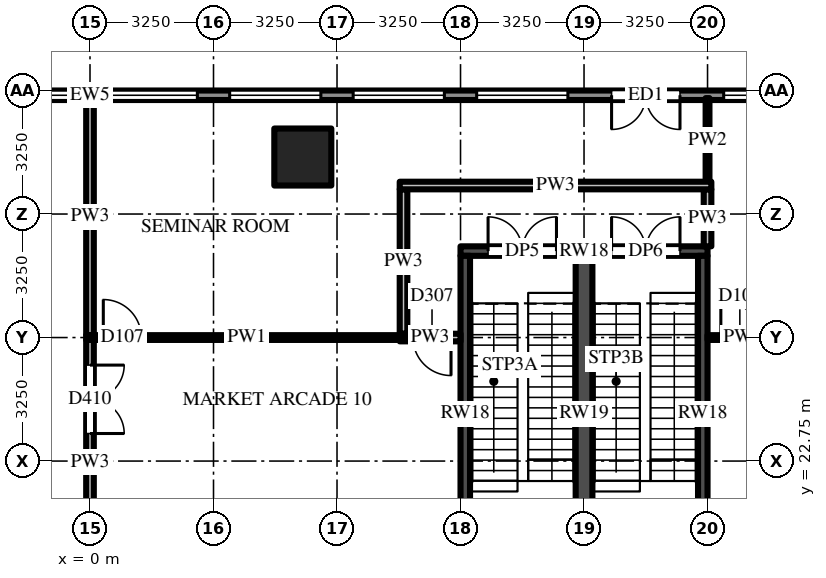
"""IFC4 building model, lengths in metres.
Left out: names, types, materials, properties, quantities, classifications, styles, units other than length and angle.
Written with IfcOpenShell. Run it as: python <this file> out.ifc"""

import sys

from ifc_helpers import new_model, si_unit, direction, frame, frame_2d, origin, origin_2d, place, context, subcontext, project, spatial, rectangle, extrude, source, transform, mapped, element, fill, save


model = new_model("IFC4")
c1 = context("Model", 3, precision=1e-05, world=origin(), true_north=direction((0.0, 1.0)))
c2 = subcontext(c1, "Body", "Model", "MODEL_VIEW")
j1 = project(units=[si_unit("LENGTHUNIT", "METRE"), si_unit("PLANEANGLEUNIT", "RADIAN")], contexts=[c1])
p1 = place(None, origin())
s1 = spatial("IfcSite", under=j1, at=p1, CompositionType="ELEMENT")
p2 = place(p1, origin())
s2 = spatial("IfcBuilding", under=s1, at=p2, CompositionType="ELEMENT")
p3 = place(p2, frame((0.0, 0.0, 24.0)))
s3 = spatial("IfcBuildingStorey", under=s2, at=p3, CompositionType="ELEMENT", Elevation=24.0)
m1 = source(origin(), c2, "Body", "SweptSolid", [
    extrude(rectangle(XDim=1.5, YDim=1.5, at=origin_2d()), origin(), (0.0, 0.0, 1.0), 5.0),
])
p4 = place(p3, frame((5.6, 30.75, 0.0), z_axis=(0.0, 0.0, 1.0), x_axis=(1.0, 0.0, 0.0)))
e1 = element("IfcColumn", 1, at=p4, inside=s3, PredefinedType="COLUMN", context=c2, shape_type="MappedRepresentation", body=[
    mapped(m1, transform((0.0, 0.0, 0.0))),
])
m2 = source(origin(), c2, "Body", "SweptSolid", [
    extrude(rectangle(XDim=6.5, YDim=0.25, at=frame_2d((3.25, 0.0))), origin(), (0.0, 0.0, 1.0), 4.7),
])
p5 = place(p3, frame((9.75, 28.275, 0.0), z_axis=(0.0, 0.0, 1.0), x_axis=(1.0, 0.0, 0.0)))
e2 = element("IfcWall", 2, at=p5, inside=s3, PredefinedType="SHEAR", context=c2, shape_type="MappedRepresentation", body=[
    mapped(m2, transform((0.0, 0.0, 0.0))),
])
m3 = source(origin(), c2, "Body", "SweptSolid", [
    extrude(rectangle(XDim=1.8, YDim=2.1, at=frame_2d((0.9, 1.05))), frame((0.0, 0.135, 0.0), z_axis=(0.0, -1.0, 0.0), x_axis=(1.0, 0.0, 0.0)), (0.0, 0.0, 1.0), 0.27),
])
p6 = place(p5, frame((0.725, 0.0, 0.0)))
e3 = element("IfcOpeningElement", 3, at=p6, cuts=e2, PredefinedType="OPENING", context=c2, shape_type="MappedRepresentation", body=[
    mapped(m3, transform((0.0, 0.0, 0.0))),
])
p7 = place(p5, frame((3.975, 0.0, 0.0)))
e4 = element("IfcOpeningElement", 4, at=p7, cuts=e2, PredefinedType="OPENING", context=c2, shape_type="MappedRepresentation", body=[
    mapped(m3, transform((0.0, 0.0, 0.0))),
])
m4 = source(origin(), c2, "Body", "SweptSolid", [
    extrude(rectangle(XDim=8.3, YDim=0.25, at=frame_2d((4.15, 0.0))), origin(), (0.0, 0.0, 1.0), 4.7),
])
for number, where, z_axis, x_axis in (
    (5, (9.875, 19.85, 0.0), (0.0, 0.0, 1.0), (0.0, 1.0, 0.0)),
    (6, (16.125, 19.85, 0.0), (0.0, 0.0, 1.0), (0.0, 1.0, 0.0)),
):
    element("IfcWall", number, at=place(p3, frame(where, z_axis=z_axis, x_axis=x_axis)), inside=s3, PredefinedType="SHEAR", context=c2, shape_type="MappedRepresentation", body=[
        mapped(m4, transform((0.0, 0.0, 0.0))),
    ])
m5 = source(origin(), c2, "Body", "SweptSolid", [
    extrude(rectangle(XDim=8.3, YDim=0.44, at=frame_2d((4.15, 0.0))), origin(), (0.0, 0.0, 1.0), 4.7),
])
p8 = place(p3, frame((13.0, 19.85, 0.0), z_axis=(0.0, 0.0, 1.0), x_axis=(0.0, 1.0, 0.0)))
e7 = element("IfcWall", 7, at=p8, inside=s3, PredefinedType="SHEAR", context=c2, shape_type="MappedRepresentation", body=[
    mapped(m5, transform((0.0, 0.0, 0.0))),
])
m6 = source(origin(), c2, "Body", "SweptSolid", [
    extrude(rectangle(XDim=58.5, YDim=0.25, at=frame_2d((29.25, 0.0))), origin(), (0.0, 0.0, 1.0), 4.7),
])
p9 = place(p3, frame((29.25, 32.375, 0.0), z_axis=(0.0, 0.0, 1.0), x_axis=(-1.0, 0.0, 0.0)))
e8 = element("IfcWall", 8, at=p9, inside=s3, PredefinedType="SOLIDWALL", context=c2, shape_type="MappedRepresentation", body=[
    mapped(m6, transform((0.0, 0.0, 0.0))),
])
m7 = source(origin(), c2, "Body", "SweptSolid", [
    extrude(rectangle(XDim=2.4, YDim=3.3, at=frame_2d((1.2, 1.65))), frame((0.0, 0.135, 0.0), z_axis=(0.0, -1.0, 0.0), x_axis=(1.0, 0.0, 0.0)), (0.0, 0.0, 1.0), 0.27),
])
p10 = place(p9, frame((0.425, 0.0, 0.6)))
e9 = element("IfcOpeningElement", 9, at=p10, cuts=e8, PredefinedType="OPENING", context=c2, shape_type="MappedRepresentation", body=[
    mapped(m7, transform((0.0, 0.0, 0.0))),
])
p11 = place(p9, frame((3.675, 0.0, 0.6)))
e10 = element("IfcOpeningElement", 10, at=p11, cuts=e8, PredefinedType="OPENING", context=c2, shape_type="MappedRepresentation", body=[
    mapped(m7, transform((0.0, 0.0, 0.0))),
])
p12 = place(p9, frame((6.925, 0.0, 0.6)))
e11 = element("IfcOpeningElement", 11, at=p12, cuts=e8, PredefinedType="OPENING", context=c2, shape_type="MappedRepresentation", body=[
    mapped(m7, transform((0.0, 0.0, 0.0))),
])
p13 = place(p9, frame((10.175, 0.0, 0.6)))
e12 = element("IfcOpeningElement", 12, at=p13, cuts=e8, PredefinedType="OPENING", context=c2, shape_type="MappedRepresentation", body=[
    mapped(m7, transform((0.0, 0.0, 0.0))),
])
m8 = source(origin(), c2, "Body", "SweptSolid", [
    extrude(rectangle(XDim=1.8, YDim=2.4, at=frame_2d((0.9, 1.2))), frame((0.0, 0.135, 0.0), z_axis=(0.0, -1.0, 0.0), x_axis=(1.0, 0.0, 0.0)), (0.0, 0.0, 1.0), 0.27),
])
p14 = place(p9, frame((13.725, 0.0, 0.0)))
e13 = element("IfcOpeningElement", 13, at=p14, cuts=e8, PredefinedType="OPENING", context=c2, shape_type="MappedRepresentation", body=[
    mapped(m8, transform((0.0, 0.0, 0.0))),
])
p15 = place(p9, frame((16.675, 0.0, 0.6)))
e14 = element("IfcOpeningElement", 14, at=p15, cuts=e8, PredefinedType="OPENING", context=c2, shape_type="MappedRepresentation", body=[
    mapped(m7, transform((0.0, 0.0, 0.0))),
])
p16 = place(p9, frame((19.925, 0.0, 0.6)))
e15 = element("IfcOpeningElement", 15, at=p16, cuts=e8, PredefinedType="OPENING", context=c2, shape_type="MappedRepresentation", body=[
    mapped(m7, transform((0.0, 0.0, 0.0))),
])
p17 = place(p9, frame((23.175, 0.0, 0.6)))
e16 = element("IfcOpeningElement", 16, at=p17, cuts=e8, PredefinedType="OPENING", context=c2, shape_type="MappedRepresentation", body=[
    mapped(m7, transform((0.0, 0.0, 0.0))),
])
p18 = place(p9, frame((26.425, 0.0, 0.6)))
e17 = element("IfcOpeningElement", 17, at=p18, cuts=e8, PredefinedType="OPENING", context=c2, shape_type="MappedRepresentation", body=[
    mapped(m7, transform((0.0, 0.0, 0.0))),
])
p19 = place(p9, frame((29.675, 0.0, 0.6)))
e18 = element("IfcOpeningElement", 18, at=p19, cuts=e8, PredefinedType="OPENING", context=c2, shape_type="MappedRepresentation", body=[
    mapped(m7, transform((0.0, 0.0, 0.0))),
])
p20 = place(p9, frame((32.925, 0.0, 0.6)))
e19 = element("IfcOpeningElement", 19, at=p20, cuts=e8, PredefinedType="OPENING", context=c2, shape_type="MappedRepresentation", body=[
    mapped(m7, transform((0.0, 0.0, 0.0))),
])
p21 = place(p9, frame((36.175, 0.0, 0.6)))
e20 = element("IfcOpeningElement", 20, at=p21, cuts=e8, PredefinedType="OPENING", context=c2, shape_type="MappedRepresentation", body=[
    mapped(m7, transform((0.0, 0.0, 0.0))),
])
p22 = place(p9, frame((39.425, 0.0, 0.6)))
e21 = element("IfcOpeningElement", 21, at=p22, cuts=e8, PredefinedType="OPENING", context=c2, shape_type="MappedRepresentation", body=[
    mapped(m7, transform((0.0, 0.0, 0.0))),
])
p23 = place(p9, frame((42.675, 0.0, 0.6)))
e22 = element("IfcOpeningElement", 22, at=p23, cuts=e8, PredefinedType="OPENING", context=c2, shape_type="MappedRepresentation", body=[
    mapped(m7, transform((0.0, 0.0, 0.0))),
])
p24 = place(p9, frame((45.925, 0.0, 0.6)))
e23 = element("IfcOpeningElement", 23, at=p24, cuts=e8, PredefinedType="OPENING", context=c2, shape_type="MappedRepresentation", body=[
    mapped(m7, transform((0.0, 0.0, 0.0))),
])
p25 = place(p9, frame((49.175, 0.0, 0.6)))
e24 = element("IfcOpeningElement", 24, at=p25, cuts=e8, PredefinedType="OPENING", context=c2, shape_type="MappedRepresentation", body=[
    mapped(m7, transform((0.0, 0.0, 0.0))),
])
p26 = place(p9, frame((52.425, 0.0, 0.6)))
e25 = element("IfcOpeningElement", 25, at=p26, cuts=e8, PredefinedType="OPENING", context=c2, shape_type="MappedRepresentation", body=[
    mapped(m7, transform((0.0, 0.0, 0.0))),
])
p27 = place(p9, frame((55.675, 0.0, 0.6)))
e26 = element("IfcOpeningElement", 26, at=p27, cuts=e8, PredefinedType="OPENING", context=c2, shape_type="MappedRepresentation", body=[
    mapped(m7, transform((0.0, 0.0, 0.0))),
])
m9 = source(origin(), c2, "Body", "SweptSolid", [
    extrude(rectangle(XDim=3.188, YDim=0.2, at=frame_2d((1.594, 0.0))), origin(), (0.0, 0.0, 1.0), 3.996),
])
p28 = place(p3, frame((0.0, 25.938, 0.0), z_axis=(0.0, 0.0, 1.0), x_axis=(0.0, -1.0, 0.0)))
e27 = element("IfcWall", 27, at=p28, inside=s3, PredefinedType="PARTITIONING", context=c2, shape_type="MappedRepresentation", body=[
    mapped(m9, transform((0.0, 0.0, 0.0))),
])
m10 = source(origin(), c2, "Body", "SweptSolid", [
    extrude(rectangle(XDim=1.8, YDim=2.1, at=frame_2d((0.9, 1.05))), frame((0.0, 0.11, 0.0), z_axis=(0.0, -1.0, 0.0), x_axis=(1.0, 0.0, 0.0)), (0.0, 0.0, 1.0), 0.22),
])
p29 = place(p28, frame((0.663, 0.0, 0.0)))
e28 = element("IfcOpeningElement", 28, at=p29, cuts=e27, PredefinedType="OPENING", context=c2, shape_type="MappedRepresentation", body=[
    mapped(m10, transform((0.0, 0.0, 0.0))),
])
m11 = source(origin(), c2, "Body", "SweptSolid", [
    extrude(rectangle(XDim=6.238, YDim=0.2, at=frame_2d((3.119, 0.0))), origin(), (0.0, 0.0, 1.0), 3.918),
])
p30 = place(p3, frame((0.0, 32.3, 0.0), z_axis=(0.0, 0.0, 1.0), x_axis=(0.0, -1.0, 0.0)))
e29 = element("IfcWall", 29, at=p30, inside=s3, PredefinedType="PARTITIONING", context=c2, shape_type="MappedRepresentation", body=[
    mapped(m11, transform((0.0, 0.0, 0.0))),
])
m12 = source(origin(), c2, "Body", "SweptSolid", [
    extrude(rectangle(XDim=3.25, YDim=0.2, at=frame_2d((1.625, 0.0))), origin(), (0.0, 0.0, 1.0), 3.996),
])
p31 = place(p3, frame((0.0, 19.5, 0.0), z_axis=(0.0, 0.0, 1.0), x_axis=(0.0, 1.0, 0.0)))
e30 = element("IfcWall", 30, at=p31, inside=s3, PredefinedType="PARTITIONING", context=c2, shape_type="MappedRepresentation", body=[
    mapped(m12, transform((0.0, 0.0, 0.0))),
])
m13 = source(origin(), c2, "Body", "SweptSolid", [
    extrude(rectangle(XDim=3.8, YDim=0.2, at=frame_2d((1.9, 0.0))), origin(), (0.0, 0.0, 1.0), 4.274),
])
p32 = place(p3, frame((8.25, 26.1, 0.0), z_axis=(0.0, 0.0, 1.0), x_axis=(0.0, 1.0, 0.0)))
e31 = element("IfcWall", 31, at=p32, inside=s3, PredefinedType="PARTITIONING", context=c2, shape_type="MappedRepresentation", body=[
    mapped(m13, transform((0.0, 0.0, 0.0))),
])
m14 = source(origin(), c2, "Body", "SweptSolid", [
    extrude(rectangle(XDim=1.5, YDim=0.2, at=frame_2d((0.75, 0.0))), origin(), (0.0, 0.0, 1.0), 4.7),
])
p33 = place(p3, frame((16.25, 29.9, 0.0), z_axis=(0.0, 0.0, 1.0), x_axis=(0.0, -1.0, 0.0)))
e32 = element("IfcWall", 32, at=p33, inside=s3, PredefinedType="PARTITIONING", context=c2, shape_type="MappedRepresentation", body=[
    mapped(m14, transform((0.0, 0.0, 0.0))),
])
m15 = source(origin(), c2, "Body", "SweptSolid", [
    extrude(rectangle(XDim=2.2, YDim=0.1, at=frame_2d((1.1, 0.0))), origin(), (0.0, 0.0, 1.0), 3.762),
])
p34 = place(p3, frame((16.25, 30.1, 0.0), z_axis=(0.0, 0.0, 1.0), x_axis=(0.0, 1.0, 0.0)))
e33 = element("IfcWall", 33, at=p34, inside=s3, PredefinedType="PARTITIONING", context=c2, shape_type="MappedRepresentation", body=[
    mapped(m15, transform((0.0, 0.0, 0.0))),
])
m16 = source(origin(), c2, "Body", "SweptSolid", [
    extrude(rectangle(XDim=1.6, YDim=0.2, at=frame_2d((0.8, 0.0))), origin(), (0.0, 0.0, 1.0), 4.7),
])
p35 = place(p3, frame((9.75, 26.0, 0.0), z_axis=(0.0, 0.0, 1.0), x_axis=(-1.0, 0.0, 0.0)))
e34 = element("IfcWall", 34, at=p35, inside=s3, PredefinedType="PARTITIONING", context=c2, shape_type="MappedRepresentation", body=[
    mapped(m16, transform((0.0, 0.0, 0.0))),
])
m17 = source(origin(), c2, "Body", "SweptSolid", [
    extrude(rectangle(XDim=1.0, YDim=2.1, at=frame_2d((0.5, 1.05))), frame((0.0, 0.11, 0.0), z_axis=(0.0, -1.0, 0.0), x_axis=(1.0, 0.0, 0.0)), (0.0, 0.0, 1.0), 0.22),
])
p36 = place(p35, frame((0.25, 0.0, 0.0)))
e35 = element("IfcOpeningElement", 35, at=p36, cuts=e34, PredefinedType="OPENING", context=c2, shape_type="MappedRepresentation", body=[
    mapped(m17, transform((0.0, 0.0, 0.0))),
])
m18 = source(origin(), c2, "Body", "SweptSolid", [
    extrude(rectangle(XDim=8.45, YDim=0.125, at=frame_2d((4.225, 0.0))), origin(), (0.0, 0.0, 1.0), 3.762),
])
p37 = place(p3, frame((-0.1, 26.0, 0.0), z_axis=(0.0, 0.0, 1.0), x_axis=(1.0, 0.0, 0.0)))
e36 = element("IfcWall", 36, at=p37, inside=s3, PredefinedType="PARTITIONING", context=c2, shape_type="MappedRepresentation", body=[
    mapped(m18, transform((0.0, 0.0, 0.0))),
])
m19 = source(origin(), c2, "Body", "SweptSolid", [
    extrude(rectangle(XDim=1.0, YDim=2.1, at=frame_2d((0.5, 1.05))), frame((0.0, 0.073, 0.0), z_axis=(0.0, -1.0, 0.0), x_axis=(1.0, 0.0, 0.0)), (0.0, 0.0, 1.0), 0.145),
])
p38 = place(p37, frame((0.45, 0.0, 0.0)))
e37 = element("IfcOpeningElement", 37, at=p38, cuts=e36, PredefinedType="OPENING", context=c2, shape_type="MappedRepresentation", body=[
    mapped(m19, transform((0.0, 0.0, 0.0))),
])
m20 = source(origin(), c2, "Body", "SweptSolid", [
    extrude(rectangle(XDim=1.85, YDim=0.125, at=frame_2d((0.925, 0.0))), origin(), (0.0, 0.0, 1.0), 4.7),
])
p39 = place(p3, frame((16.25, 26.0, 0.0), z_axis=(0.0, 0.0, 1.0), x_axis=(1.0, 0.0, 0.0)))
e38 = element("IfcWall", 38, at=p39, inside=s3, PredefinedType="PARTITIONING", context=c2, shape_type="MappedRepresentation", body=[
    mapped(m20, transform((0.0, 0.0, 0.0))),
])
p40 = place(p39, frame((0.35, 0.0, 0.0)))
e39 = element("IfcOpeningElement", 39, at=p40, cuts=e38, PredefinedType="OPENING", context=c2, shape_type="MappedRepresentation", body=[
    mapped(m19, transform((0.0, 0.0, 0.0))),
])
m21 = source(origin(), c2, "Body", "SweptSolid", [
    extrude(rectangle(XDim=8.2, YDim=0.2, at=frame_2d((4.1, 0.0))), origin(), (0.0, 0.0, 1.0), 4.7),
])
p41 = place(p3, frame((16.35, 30.0, 0.0), z_axis=(0.0, 0.0, 1.0), x_axis=(-1.0, 0.0, 0.0)))
e40 = element("IfcWall", 40, at=p41, inside=s3, PredefinedType="PARTITIONING", context=c2, shape_type="MappedRepresentation", body=[
    mapped(m21, transform((0.0, 0.0, 0.0))),
])
m22 = source(origin(), c2, "Body", "SweptSolid", [
    extrude(rectangle(XDim=1.8, YDim=2.1, at=frame_2d((0.9, 1.05))), frame((0.0, 0.025, 0.0), z_axis=(0.0, -1.0, 0.0), x_axis=(1.0, 0.0, 0.0)), (0.0, 0.0, 1.0), 0.05),
])
p42 = place(p6, origin())
e41 = element("IfcDoor", 41, at=p42, inside=s3, OperationType="DOUBLE_DOOR_SINGLE_SWING", PredefinedType="DOOR", context=c2, shape_type="MappedRepresentation", body=[
    mapped(m22, transform((0.0, 0.0, 0.0))),
])
fill(e3, e41)
p43 = place(p7, origin())
e42 = element("IfcDoor", 42, at=p43, inside=s3, OperationType="DOUBLE_DOOR_SINGLE_SWING", PredefinedType="DOOR", context=c2, shape_type="MappedRepresentation", body=[
    mapped(m22, transform((0.0, 0.0, 0.0))),
])
fill(e4, e42)
m23 = source(origin(), c2, "Body", "SweptSolid", [
    extrude(rectangle(XDim=2.4, YDim=3.3, at=frame_2d((1.2, 1.65))), frame((0.0, 0.03, 0.0), z_axis=(0.0, -1.0, 0.0), x_axis=(1.0, 0.0, 0.0)), (0.0, 0.0, 1.0), 0.06),
])
p44 = place(p13, origin())
e43 = element("IfcWindow", 43, at=p44, inside=s3, PartitioningType="SINGLE_PANEL", PredefinedType="WINDOW", context=c2, shape_type="MappedRepresentation", body=[
    mapped(m23, transform((0.0, 0.0, 0.0))),
])
fill(e12, e43)
m24 = source(origin(), c2, "Body", "SweptSolid", [
    extrude(rectangle(XDim=1.8, YDim=2.4, at=frame_2d((0.9, 1.2))), frame((0.0, 0.025, 0.0), z_axis=(0.0, -1.0, 0.0), x_axis=(1.0, 0.0, 0.0)), (0.0, 0.0, 1.0), 0.05),
])
p45 = place(p14, origin())
e44 = element("IfcDoor", 44, at=p45, inside=s3, OperationType="DOUBLE_DOOR_SINGLE_SWING", PredefinedType="DOOR", context=c2, shape_type="MappedRepresentation", body=[
    mapped(m24, transform((0.0, 0.0, 0.0))),
])
fill(e13, e44)
p46 = place(p15, origin())
e45 = element("IfcWindow", 45, at=p46, inside=s3, PartitioningType="SINGLE_PANEL", PredefinedType="WINDOW", context=c2, shape_type="MappedRepresentation", body=[
    mapped(m23, transform((0.0, 0.0, 0.0))),
])
fill(e14, e45)
p47 = place(p16, origin())
e46 = element("IfcWindow", 46, at=p47, inside=s3, PartitioningType="SINGLE_PANEL", PredefinedType="WINDOW", context=c2, shape_type="MappedRepresentation", body=[
    mapped(m23, transform((0.0, 0.0, 0.0))),
])
fill(e15, e46)
p48 = place(p17, origin())
e47 = element("IfcWindow", 47, at=p48, inside=s3, PartitioningType="SINGLE_PANEL", PredefinedType="WINDOW", context=c2, shape_type="MappedRepresentation", body=[
    mapped(m23, transform((0.0, 0.0, 0.0))),
])
fill(e16, e47)
p49 = place(p18, origin())
e48 = element("IfcWindow", 48, at=p49, inside=s3, PartitioningType="SINGLE_PANEL", PredefinedType="WINDOW", context=c2, shape_type="MappedRepresentation", body=[
    mapped(m23, transform((0.0, 0.0, 0.0))),
])
fill(e17, e48)
p50 = place(p19, origin())
e49 = element("IfcWindow", 49, at=p50, inside=s3, PartitioningType="SINGLE_PANEL", PredefinedType="WINDOW", context=c2, shape_type="MappedRepresentation", body=[
    mapped(m23, transform((0.0, 0.0, 0.0))),
])
fill(e18, e49)
p51 = place(p29, origin())
e50 = element("IfcDoor", 50, at=p51, inside=s3, OperationType="DOUBLE_DOOR_SINGLE_SWING", PredefinedType="DOOR", context=c2, shape_type="MappedRepresentation", body=[
    mapped(m22, transform((0.0, 0.0, 0.0))),
])
fill(e28, e50)
m25 = source(origin(), c2, "Body", "SweptSolid", [
    extrude(rectangle(XDim=1.0, YDim=2.1, at=frame_2d((0.5, 1.05))), frame((0.0, 0.025, 0.0), z_axis=(0.0, -1.0, 0.0), x_axis=(1.0, 0.0, 0.0)), (0.0, 0.0, 1.0), 0.05),
])
p52 = place(p38, origin())
e51 = element("IfcDoor", 51, at=p52, inside=s3, OperationType="SINGLE_SWING_LEFT", PredefinedType="DOOR", context=c2, shape_type="MappedRepresentation", body=[
    mapped(m25, transform((0.0, 0.0, 0.0))),
])
fill(e37, e51)
p53 = place(p36, origin())
e52 = element("IfcDoor", 52, at=p53, inside=s3, OperationType="SINGLE_SWING_LEFT", PredefinedType="DOOR", context=c2, shape_type="MappedRepresentation", body=[
    mapped(m25, transform((0.0, 0.0, 0.0))),
])
fill(e35, e52)
p54 = place(p40, origin())
e53 = element("IfcDoor", 53, at=p54, inside=s3, OperationType="SINGLE_SWING_LEFT", PredefinedType="DOOR", context=c2, shape_type="MappedRepresentation", body=[
    mapped(m25, transform((0.0, 0.0, 0.0))),
])
fill(e39, e53)
save(model, sys.argv[1])
